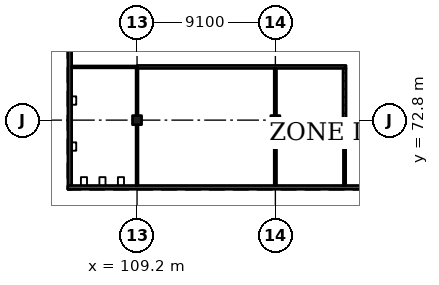
"""IFC4 building model, lengths in metres.
Left out: names, types, materials, properties, quantities, classifications, styles, units other than length and angle.
Written with IfcOpenShell. Run it as: python <this file> out.ifc"""

import sys

from ifc_helpers import new_model, si_unit, direction, frame, frame_2d, origin, origin_2d, place, context, subcontext, project, spatial, rectangle, extrude, element, fill, save


model = new_model("IFC4")
c1 = context("Model", 3, precision=1e-05, world=origin(), true_north=direction((0.0, 1.0)))
c2 = subcontext(c1, "Body", "Model", "MODEL_VIEW")
j1 = project(units=[si_unit("LENGTHUNIT", "METRE"), si_unit("PLANEANGLEUNIT", "RADIAN")], contexts=[c1])
p1 = place(None, origin())
s1 = spatial("IfcSite", under=j1, at=p1, CompositionType="ELEMENT")
p2 = place(p1, origin())
s2 = spatial("IfcBuilding", under=s1, at=p2, CompositionType="ELEMENT")
p3 = place(p2, frame((0.0, 0.0, 24.57)))
s3 = spatial("IfcBuildingStorey", under=s2, at=p3, CompositionType="ELEMENT", Elevation=24.57)
for number, where, z_axis, x_axis in (
    (1, (109.2, 72.8, 0.0), (0.0, 0.0, 1.0), (1.0, 0.0, 0.0)),
    (2, (118.3, 72.8, 0.0), (0.0, 0.0, 1.0), (1.0, 0.0, 0.0)),
):
    element("IfcColumn", number, at=place(p3, frame(where, z_axis=z_axis, x_axis=x_axis)), inside=s3, PredefinedType="COLUMN", context=c2, shape_type="SweptSolid", body=[
        extrude(rectangle(XDim=0.6, YDim=0.6, at=origin_2d()), origin(), (0.0, 0.0, 1.0), 4.55),
    ])
for number, where, z_axis, x_axis in (
    (3, (104.775, 68.25, 0.0), (0.0, 0.0, 1.0), (0.0, 1.0, 0.0)),
    (4, (104.65, 68.375, 0.0), (0.0, 0.0, 1.0), (1.0, 0.0, 0.0)),
):
    element("IfcWall", number, at=place(p3, frame(where, z_axis=z_axis, x_axis=x_axis)), inside=s3, PredefinedType="SHEAR", context=c2, shape_type="SweptSolid", body=[
        extrude(rectangle(XDim=31.85, YDim=0.25, at=frame_2d((15.925, 0.0))), origin(), (0.0, 0.0, 1.0), 4.55),
    ])
p4 = place(p3, frame((104.9, 76.3, 0.0), z_axis=(0.0, 0.0, 1.0), x_axis=(1.0, 0.0, 0.0)))
e5 = element("IfcWall", 5, at=p4, inside=s3, PredefinedType="PARTITIONING", context=c2, shape_type="SweptSolid", body=[
    extrude(rectangle(XDim=4.3, YDim=0.125, at=frame_2d((2.15, 0.0))), origin(), (0.0, 0.0, 1.0), 4.35),
])
p5 = place(p4, frame((1.65, 0.0, 0.0)))
e6 = element("IfcOpeningElement", 6, at=p5, cuts=e5, PredefinedType="OPENING", context=c2, shape_type="SweptSolid", body=[
    extrude(rectangle(XDim=0.9, YDim=2.1, at=frame_2d((0.45, 1.05))), frame((0.0, 0.073, 0.0), z_axis=(0.0, -1.0, 0.0), x_axis=(1.0, 0.0, 0.0)), (0.0, 0.0, 1.0), 0.145),
])
p6 = place(p3, frame((109.2, 68.5, 0.0), z_axis=(0.0, 0.0, 1.0), x_axis=(0.0, 1.0, 0.0)))
e7 = element("IfcWall", 7, at=p6, inside=s3, PredefinedType="PARTITIONING", context=c2, shape_type="SweptSolid", body=[
    extrude(rectangle(XDim=4.0, YDim=0.125, at=frame_2d((2.0, 0.0))), origin(), (0.0, 0.0, 1.0), 4.35),
])
p7 = place(p3, frame((109.2, 73.1, 0.0), z_axis=(0.0, 0.0, 1.0), x_axis=(0.0, 1.0, 0.0)))
e8 = element("IfcWall", 8, at=p7, inside=s3, PredefinedType="PARTITIONING", context=c2, shape_type="SweptSolid", body=[
    extrude(rectangle(XDim=3.1, YDim=0.125, at=frame_2d((1.55, 0.0))), origin(), (0.0, 0.0, 1.0), 3.6),
])
p8 = place(p3, frame((109.2, 76.3, 0.0), z_axis=(0.0, 0.0, 1.0), x_axis=(1.0, 0.0, 0.0)))
e9 = element("IfcWall", 9, at=p8, inside=s3, PredefinedType="PARTITIONING", context=c2, shape_type="SweptSolid", body=[
    extrude(rectangle(XDim=13.75, YDim=0.2, at=frame_2d((6.875, 0.0))), origin(), (0.0, 0.0, 1.0), 4.35),
])
p9 = place(p8, frame((10.55, 0.0, 0.0)))
e10 = element("IfcOpeningElement", 10, at=p9, cuts=e9, PredefinedType="OPENING", context=c2, shape_type="SweptSolid", body=[
    extrude(rectangle(XDim=1.8, YDim=2.1, at=frame_2d((0.9, 1.05))), frame((0.0, 0.11, 0.0), z_axis=(0.0, -1.0, 0.0), x_axis=(1.0, 0.0, 0.0)), (0.0, 0.0, 1.0), 0.22),
])
p10 = place(p8, frame((4.05, 0.0, 0.0)))
e11 = element("IfcOpeningElement", 11, at=p10, cuts=e9, PredefinedType="OPENING", context=c2, shape_type="SweptSolid", body=[
    extrude(rectangle(XDim=1.0, YDim=2.1, at=frame_2d((0.5, 1.05))), frame((0.0, 0.11, 0.0), z_axis=(0.0, -1.0, 0.0), x_axis=(1.0, 0.0, 0.0)), (0.0, 0.0, 1.0), 0.22),
])
p11 = place(p3, frame((118.3, 68.5, 0.0), z_axis=(0.0, 0.0, 1.0), x_axis=(0.0, 1.0, 0.0)))
e12 = element("IfcWall", 12, at=p11, inside=s3, PredefinedType="PARTITIONING", context=c2, shape_type="SweptSolid", body=[
    extrude(rectangle(XDim=4.0, YDim=0.15, at=frame_2d((2.0, 0.0))), origin(), (0.0, 0.0, 1.0), 4.35),
])
p12 = place(p3, frame((118.3, 73.1, 0.0), z_axis=(0.0, 0.0, 1.0), x_axis=(0.0, 1.0, 0.0)))
e13 = element("IfcWall", 13, at=p12, inside=s3, PredefinedType="PARTITIONING", context=c2, shape_type="SweptSolid", body=[
    extrude(rectangle(XDim=3.1, YDim=0.15, at=frame_2d((1.55, 0.0))), origin(), (0.0, 0.0, 1.0), 3.6),
])
p13 = place(p3, frame((122.85, 68.5, 0.0), z_axis=(0.0, 0.0, 1.0), x_axis=(0.0, 1.0, 0.0)))
e14 = element("IfcWall", 14, at=p13, inside=s3, PredefinedType="PARTITIONING", context=c2, shape_type="SweptSolid", body=[
    extrude(rectangle(XDim=4.3, YDim=0.15, at=frame_2d((2.15, 0.0))), origin(), (0.0, 0.0, 1.0), 4.35),
])
p14 = place(p3, frame((122.85, 76.2, 0.0), z_axis=(0.0, 0.0, 1.0), x_axis=(0.0, -1.0, 0.0)))
e15 = element("IfcWall", 15, at=p14, inside=s3, PredefinedType="PARTITIONING", context=c2, shape_type="SweptSolid", body=[
    extrude(rectangle(XDim=3.4, YDim=0.2, at=frame_2d((1.7, 0.0))), origin(), (0.0, 0.0, 1.0), 3.65),
])
p15 = place(p3, frame((122.95, 72.8, 0.0), z_axis=(0.0, 0.0, 1.0), x_axis=(1.0, 0.0, 0.0)))
e16 = element("IfcWall", 16, at=p15, inside=s3, PredefinedType="PARTITIONING", context=c2, shape_type="SweptSolid", body=[
    extrude(rectangle(XDim=4.15, YDim=0.2, at=frame_2d((2.075, 0.0))), origin(), (0.0, 0.0, 1.0), 3.6),
])
p16 = place(p9, origin())
e17 = element("IfcDoor", 17, at=p16, inside=s3, OperationType="DOUBLE_DOOR_SINGLE_SWING", PredefinedType="DOOR", context=c2, shape_type="SweptSolid", body=[
    extrude(rectangle(XDim=1.8, YDim=2.1, at=frame_2d((0.9, 1.05))), frame((0.0, 0.025, 0.0), z_axis=(0.0, -1.0, 0.0), x_axis=(1.0, 0.0, 0.0)), (0.0, 0.0, 1.0), 0.05),
])
fill(e10, e17)
p17 = place(p10, origin())
e18 = element("IfcDoor", 18, at=p17, inside=s3, OperationType="SINGLE_SWING_RIGHT", PredefinedType="DOOR", context=c2, shape_type="SweptSolid", body=[
    extrude(rectangle(XDim=1.0, YDim=2.1, at=frame_2d((0.5, 1.05))), frame((0.0, 0.025, 0.0), z_axis=(0.0, -1.0, 0.0), x_axis=(1.0, 0.0, 0.0)), (0.0, 0.0, 1.0), 0.05),
])
fill(e11, e18)
p18 = place(p5, origin())
e19 = element("IfcDoor", 19, at=p18, inside=s3, OperationType="SINGLE_SWING_LEFT", PredefinedType="DOOR", context=c2, shape_type="SweptSolid", body=[
    extrude(rectangle(XDim=0.9, YDim=2.1, at=frame_2d((0.45, 1.05))), frame((0.0, 0.025, 0.0), z_axis=(0.0, -1.0, 0.0), x_axis=(1.0, 0.0, 0.0)), (0.0, 0.0, 1.0), 0.05),
])
fill(e6, e19)
save(model, sys.argv[1])
